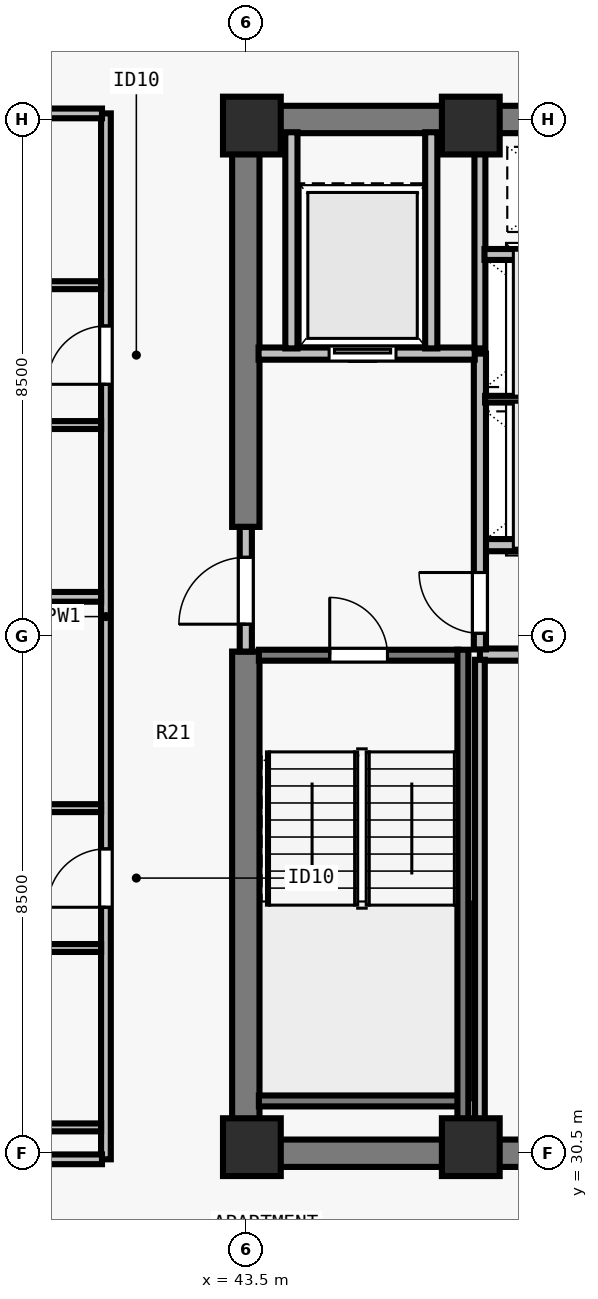
"""IFC4 building model, lengths in metres.
Left out: names, types, materials, properties, quantities, classifications, styles, units other than length and angle.
Written with IfcOpenShell. Run it as: python <this file> out.ifc"""

import sys

from ifc_helpers import new_model, si_unit, direction, frame, frame_2d, origin, origin_2d, place, context, subcontext, project, spatial, rectangle, extrude, element, fill, save


model = new_model("IFC4")
c1 = context("Model", 3, precision=1e-05, world=origin(), true_north=direction((0.0, 1.0)))
c2 = subcontext(c1, "Body", "Model", "MODEL_VIEW")
j1 = project(units=[si_unit("LENGTHUNIT", "METRE"), si_unit("PLANEANGLEUNIT", "RADIAN")], contexts=[c1])
p1 = place(None, origin())
s1 = spatial("IfcSite", under=j1, at=p1, CompositionType="ELEMENT")
p2 = place(p1, origin())
s2 = spatial("IfcBuilding", under=s1, at=p2, CompositionType="ELEMENT")
p3 = place(p2, frame((0.0, 0.0, 241.0)))
s3 = spatial("IfcBuildingStorey", under=s2, at=p3, CompositionType="ELEMENT", Elevation=241.0)
for number, where, z_axis, x_axis in (
    (1, (43.6, 30.6, 0.0), (0.0, 0.0, 1.0), (1.0, 0.0, 0.0)),
    (2, (47.2, 30.6, 0.0), (0.0, 0.0, 1.0), (1.0, 0.0, 0.0)),
    (3, (43.6, 47.4, 0.0), (0.0, 0.0, 1.0), (1.0, 0.0, 0.0)),
    (4, (47.2, 47.4, 0.0), (0.0, 0.0, 1.0), (1.0, 0.0, 0.0)),
):
    element("IfcColumn", number, at=place(p3, frame(where, z_axis=z_axis, x_axis=x_axis)), inside=s3, PredefinedType="COLUMN", context=c2, shape_type="SweptSolid", body=[
        extrude(rectangle(XDim=0.95, YDim=0.95, at=origin_2d()), origin(), (0.0, 0.0, 1.0), 3.5),
    ])
for number, where, z_axis, x_axis in (
    (5, (43.275, 30.5, 0.0), (0.0, 0.0, 1.0), (1.0, 0.0, 0.0)),
    (6, (43.275, 47.5, 0.0), (0.0, 0.0, 1.0), (1.0, 0.0, 0.0)),
):
    element("IfcWall", number, at=place(p3, frame(where, z_axis=z_axis, x_axis=x_axis)), inside=s3, PredefinedType="SHEAR", context=c2, shape_type="SweptSolid", body=[
        extrude(rectangle(XDim=17.45, YDim=0.45, at=frame_2d((8.725, 0.0))), origin(), (0.0, 0.0, 1.0), 3.29),
    ])
p4 = place(p3, frame((43.5, 30.715, 0.0), z_axis=(0.0, 0.0, 1.0), x_axis=(0.0, 1.0, 0.0)))
e7 = element("IfcWall", 7, at=p4, inside=s3, PredefinedType="SHEAR", context=c2, shape_type="SweptSolid", body=[
    extrude(rectangle(XDim=8.035, YDim=0.45, at=frame_2d((4.018, 0.0))), origin(), (0.0, 0.0, 1.0), 3.29),
])
p5 = place(p3, frame((43.5, 40.8, 0.0), z_axis=(0.0, 0.0, 1.0), x_axis=(0.0, 1.0, 0.0)))
e8 = element("IfcWall", 8, at=p5, inside=s3, PredefinedType="SHEAR", context=c2, shape_type="SweptSolid", body=[
    extrude(rectangle(XDim=6.485, YDim=0.45, at=frame_2d((3.242, 0.0))), origin(), (0.0, 0.0, 1.0), 3.29),
])
for number, where, z_axis, x_axis in (
    (9, (47.35, 38.7, 0.0), (0.0, 0.0, 1.0), (1.0, 0.0, 0.0)),
    (10, (47.35, 40.5, 0.0), (0.0, 0.0, 1.0), (1.0, 0.0, 0.0)),
):
    element("IfcWall", number, at=place(p3, frame(where, z_axis=z_axis, x_axis=x_axis)), inside=s3, PredefinedType="SOLIDWALL", context=c2, shape_type="SweptSolid", body=[
        extrude(rectangle(XDim=2.95, YDim=0.2, at=frame_2d((1.475, 0.0))), origin(), (0.0, 0.0, 1.0), 3.29),
    ])
p6 = place(p3, frame((43.5, 38.75, 0.0), z_axis=(0.0, 0.0, 1.0), x_axis=(0.0, 1.0, 0.0)))
e11 = element("IfcWall", 11, at=p6, inside=s3, PredefinedType="SOLIDWALL", context=c2, shape_type="SweptSolid", body=[
    extrude(rectangle(XDim=2.05, YDim=0.2, at=frame_2d((1.025, 0.0))), origin(), (0.0, 0.0, 1.0), 3.29),
])
p7 = place(p6, frame((0.45, 0.0, 0.0)))
e12 = element("IfcOpeningElement", 12, at=p7, cuts=e11, PredefinedType="OPENING", context=c2, shape_type="SweptSolid", body=[
    extrude(rectangle(XDim=1.1, YDim=2.15, at=frame_2d((0.55, 1.075))), frame((0.0, 0.11, 0.0), z_axis=(0.0, -1.0, 0.0), x_axis=(1.0, 0.0, 0.0)), (0.0, 0.0, 1.0), 0.22),
])
p8 = place(p3, frame((47.35, 38.785, 0.0), z_axis=(0.0, 0.0, 1.0), x_axis=(0.0, 1.0, 0.0)))
e13 = element("IfcWall", 13, at=p8, inside=s3, PredefinedType="SOLIDWALL", context=c2, shape_type="SweptSolid", body=[
    extrude(rectangle(XDim=4.865, YDim=0.2, at=frame_2d((2.433, 0.0))), origin(), (0.0, 0.0, 1.0), 3.29),
])
p9 = place(p8, frame((0.265, 0.0, 0.0)))
e14 = element("IfcOpeningElement", 14, at=p9, cuts=e13, PredefinedType="OPENING", context=c2, shape_type="SweptSolid", body=[
    extrude(rectangle(XDim=1.0, YDim=2.15, at=frame_2d((0.5, 1.075))), frame((0.0, 0.11, 0.0), z_axis=(0.0, -1.0, 0.0), x_axis=(1.0, 0.0, 0.0)), (0.0, 0.0, 1.0), 0.22),
])
p10 = place(p3, frame((43.71, 43.65, 0.0), z_axis=(0.0, 0.0, 1.0), x_axis=(1.0, 0.0, 0.0)))
e15 = element("IfcWall", 15, at=p10, inside=s3, PredefinedType="SOLIDWALL", context=c2, shape_type="SweptSolid", body=[
    extrude(rectangle(XDim=3.555, YDim=0.2, at=frame_2d((1.777, 0.0))), origin(), (0.0, 0.0, 1.0), 3.29),
])
p11 = place(p10, frame((1.16, 0.0, 0.0)))
e16 = element("IfcOpeningElement", 16, at=p11, cuts=e15, PredefinedType="OPENING", context=c2, shape_type="SweptSolid", body=[
    extrude(rectangle(XDim=1.1, YDim=2.2, at=frame_2d((0.55, 1.1))), frame((0.0, 0.11, 0.0), z_axis=(0.0, -1.0, 0.0), x_axis=(1.0, 0.0, 0.0)), (0.0, 0.0, 1.0), 0.22),
])
for number, where, z_axis, x_axis in (
    (17, (46.55, 43.735, 0.0), (0.0, 0.0, 1.0), (0.0, 1.0, 0.0)),
    (18, (44.25, 43.735, 0.0), (0.0, 0.0, 1.0), (0.0, 1.0, 0.0)),
):
    element("IfcWall", number, at=place(p3, frame(where, z_axis=z_axis, x_axis=x_axis)), inside=s3, PredefinedType="SOLIDWALL", context=c2, shape_type="SweptSolid", body=[
        extrude(rectangle(XDim=3.555, YDim=0.2, at=frame_2d((1.777, 0.0))), origin(), (0.0, 0.0, 1.0), 3.29),
    ])
p12 = place(p3, frame((47.35, 30.71, 0.0), z_axis=(0.0, 0.0, 1.0), x_axis=(0.0, 1.0, 0.0)))
e19 = element("IfcWall", 19, at=p12, inside=s3, PredefinedType="PARTITIONING", context=c2, shape_type="SweptSolid", body=[
    extrude(rectangle(XDim=7.905, YDim=0.16, at=frame_2d((3.953, 0.0))), origin(), (0.0, 0.0, 1.0), 3.29),
])
p13 = place(p3, frame((47.35, 43.735, 0.0), z_axis=(0.0, 0.0, 1.0), x_axis=(0.0, 1.0, 0.0)))
e20 = element("IfcWall", 20, at=p13, inside=s3, PredefinedType="SOLIDWALL", context=c2, shape_type="SweptSolid", body=[
    extrude(rectangle(XDim=3.555, YDim=0.18, at=frame_2d((1.777, 0.0))), origin(), (0.0, 0.0, 1.0), 3.29),
])
p14 = place(p3, frame((47.435, 42.9, 0.0), z_axis=(0.0, 0.0, 1.0), x_axis=(1.0, 0.0, 0.0)))
e21 = element("IfcWall", 21, at=p14, inside=s3, PredefinedType="PARTITIONING", context=c2, shape_type="SweptSolid", body=[
    extrude(rectangle(XDim=2.78, YDim=0.11, at=frame_2d((1.39, 0.0))), origin(), (0.0, 0.0, 1.0), 3.29),
])
p15 = place(p3, frame((47.425, 45.28, 0.0), z_axis=(0.0, 0.0, 1.0), x_axis=(1.0, 0.0, 0.0)))
e22 = element("IfcWall", 22, at=p15, inside=s3, PredefinedType="SOLIDWALL", context=c2, shape_type="SweptSolid", body=[
    extrude(rectangle(XDim=2.79, YDim=0.18, at=frame_2d((1.395, 0.0))), origin(), (0.0, 0.0, 1.0), 3.29),
])
p16 = place(p3, frame((41.2, 30.4, 0.0), z_axis=(0.0, 0.0, 1.0), x_axis=(0.0, 1.0, 0.0)))
e23 = element("IfcWall", 23, at=p16, inside=s3, PredefinedType="PARTITIONING", context=c2, shape_type="SweptSolid", body=[
    extrude(rectangle(XDim=17.2, YDim=0.16, at=frame_2d((8.6, 0.0))), origin(), (0.0, 0.0, 1.0), 3.29),
])
p17 = place(p16, frame((4.145, 0.0, 0.0)))
e24 = element("IfcOpeningElement", 24, at=p17, cuts=e23, PredefinedType="OPENING", context=c2, shape_type="SweptSolid", body=[
    extrude(rectangle(XDim=0.96, YDim=2.18, at=frame_2d((0.48, 1.09))), frame((0.0, 0.09, 0.0), z_axis=(0.0, -1.0, 0.0), x_axis=(1.0, 0.0, 0.0)), (0.0, 0.0, 1.0), 0.18),
])
p18 = place(p16, frame((12.745, 0.0, 0.0)))
e25 = element("IfcOpeningElement", 25, at=p18, cuts=e23, PredefinedType="OPENING", context=c2, shape_type="SweptSolid", body=[
    extrude(rectangle(XDim=0.96, YDim=2.18, at=frame_2d((0.48, 1.09))), frame((0.0, 0.09, 0.0), z_axis=(0.0, -1.0, 0.0), x_axis=(1.0, 0.0, 0.0)), (0.0, 0.0, 1.0), 0.18),
])
for number, where, z_axis, x_axis in (
    (26, (29.805, 30.4, 0.0), (0.0, 0.0, 1.0), (1.0, 0.0, 0.0)),
    (27, (29.805, 47.6, 0.0), (0.0, 0.0, 1.0), (1.0, 0.0, 0.0)),
):
    element("IfcWall", number, at=place(p3, frame(where, z_axis=z_axis, x_axis=x_axis)), inside=s3, PredefinedType="PARTITIONING", context=c2, shape_type="SweptSolid", body=[
        extrude(rectangle(XDim=11.33, YDim=0.16, at=frame_2d((5.665, 0.0))), origin(), (0.0, 0.0, 1.0), 3.29),
    ])
p19 = place(p3, frame((29.77, 39.65, 0.0), z_axis=(0.0, 0.0, 1.0), x_axis=(1.0, 0.0, 0.0)))
e28 = element("IfcWall", 28, at=p19, inside=s3, PredefinedType="PARTITIONING", context=c2, shape_type="SweptSolid", body=[
    extrude(rectangle(XDim=11.35, YDim=0.16, at=frame_2d((5.675, 0.0))), origin(), (0.0, 0.0, 1.0), 2.958),
])
p20 = place(p3, frame((38.37, 30.925, 0.0), z_axis=(0.0, 0.0, 1.0), x_axis=(1.0, 0.0, 0.0)))
e29 = element("IfcWall", 29, at=p20, inside=s3, PredefinedType="PLUMBINGWALL", context=c2, shape_type="SweptSolid", body=[
    extrude(rectangle(XDim=2.75, YDim=0.13, at=frame_2d((1.375, 0.0))), origin(), (0.0, 0.0, 1.0), 3.29),
])
p21 = place(p3, frame((38.37, 33.875, 0.0), z_axis=(0.0, 0.0, 1.0), x_axis=(1.0, 0.0, 0.0)))
e30 = element("IfcWall", 30, at=p21, inside=s3, PredefinedType="PLUMBINGWALL", context=c2, shape_type="SweptSolid", body=[
    extrude(rectangle(XDim=2.75, YDim=0.13, at=frame_2d((1.375, 0.0))), origin(), (0.0, 0.0, 1.0), 3.29),
])
p22 = place(p21, frame((0.55, 0.0, 0.0)))
e31 = element("IfcOpeningElement", 31, at=p22, cuts=e30, PredefinedType="OPENING", context=c2, shape_type="SweptSolid", body=[
    extrude(rectangle(XDim=0.85, YDim=2.08, at=frame_2d((0.425, 1.04))), frame((0.0, 0.075, 0.0), z_axis=(0.0, -1.0, 0.0), x_axis=(1.0, 0.0, 0.0)), (0.0, 0.0, 1.0), 0.15),
])
p23 = place(p3, frame((38.37, 36.175, 0.0), z_axis=(0.0, 0.0, 1.0), x_axis=(1.0, 0.0, 0.0)))
e32 = element("IfcWall", 32, at=p23, inside=s3, PredefinedType="PLUMBINGWALL", context=c2, shape_type="SweptSolid", body=[
    extrude(rectangle(XDim=2.75, YDim=0.13, at=frame_2d((1.375, 0.0))), origin(), (0.0, 0.0, 1.0), 3.29),
])
p24 = place(p23, frame((0.55, 0.0, 0.0)))
e33 = element("IfcOpeningElement", 33, at=p24, cuts=e32, PredefinedType="OPENING", context=c2, shape_type="SweptSolid", body=[
    extrude(rectangle(XDim=0.88, YDim=2.1, at=frame_2d((0.44, 1.05))), frame((0.0, 0.075, 0.0), z_axis=(0.0, -1.0, 0.0), x_axis=(1.0, 0.0, 0.0)), (0.0, 0.0, 1.0), 0.15),
])
p25 = place(p3, frame((38.37, 42.475, 0.0), z_axis=(0.0, 0.0, 1.0), x_axis=(1.0, 0.0, 0.0)))
e34 = element("IfcWall", 34, at=p25, inside=s3, PredefinedType="PLUMBINGWALL", context=c2, shape_type="SweptSolid", body=[
    extrude(rectangle(XDim=2.75, YDim=0.13, at=frame_2d((1.375, 0.0))), origin(), (0.0, 0.0, 1.0), 2.958),
])
p26 = place(p25, frame((0.55, 0.0, 0.0)))
e35 = element("IfcOpeningElement", 35, at=p26, cuts=e34, PredefinedType="OPENING", context=c2, shape_type="SweptSolid", body=[
    extrude(rectangle(XDim=0.85, YDim=2.08, at=frame_2d((0.425, 1.04))), frame((0.0, 0.075, 0.0), z_axis=(0.0, -1.0, 0.0), x_axis=(1.0, 0.0, 0.0)), (0.0, 0.0, 1.0), 0.15),
])
p27 = place(p3, frame((38.37, 44.775, 0.0), z_axis=(0.0, 0.0, 1.0), x_axis=(1.0, 0.0, 0.0)))
e36 = element("IfcWall", 36, at=p27, inside=s3, PredefinedType="PLUMBINGWALL", context=c2, shape_type="SweptSolid", body=[
    extrude(rectangle(XDim=2.75, YDim=0.13, at=frame_2d((1.375, 0.0))), origin(), (0.0, 0.0, 1.0), 2.958),
])
p28 = place(p27, frame((0.55, 0.0, 0.0)))
e37 = element("IfcOpeningElement", 37, at=p28, cuts=e36, PredefinedType="OPENING", context=c2, shape_type="SweptSolid", body=[
    extrude(rectangle(XDim=0.88, YDim=2.1, at=frame_2d((0.44, 1.05))), frame((0.0, 0.075, 0.0), z_axis=(0.0, -1.0, 0.0), x_axis=(1.0, 0.0, 0.0)), (0.0, 0.0, 1.0), 0.15),
])
p29 = place(p3, frame((43.715, 38.69, 0.0), z_axis=(0.0, 0.0, 1.0), x_axis=(1.0, 0.0, 0.0)))
e38 = element("IfcWall", 38, at=p29, inside=s3, PredefinedType="SOLIDWALL", context=c2, shape_type="SweptSolid", body=[
    extrude(rectangle(XDim=3.28, YDim=0.18, at=frame_2d((1.64, 0.0))), origin(), (0.0, 0.0, 1.0), 3.29),
])
p30 = place(p29, frame((1.165, 0.0, 0.0)))
e39 = element("IfcOpeningElement", 39, at=p30, cuts=e38, PredefinedType="OPENING", context=c2, shape_type="SweptSolid", body=[
    extrude(rectangle(XDim=0.95, YDim=2.15, at=frame_2d((0.475, 1.075))), frame((0.0, 0.1, 0.0), z_axis=(0.0, -1.0, 0.0), x_axis=(1.0, 0.0, 0.0)), (0.0, 0.0, 1.0), 0.2),
])
p31 = place(p3, frame((43.715, 31.36, 0.0), z_axis=(0.0, 0.0, 1.0), x_axis=(1.0, 0.0, 0.0)))
e40 = element("IfcWall", 40, at=p31, inside=s3, PredefinedType="SOLIDWALL", context=c2, shape_type="SweptSolid", body=[
    extrude(rectangle(XDim=3.28, YDim=0.18, at=frame_2d((1.64, 0.0))), origin(), (0.0, 0.0, 1.0), 3.29),
])
p32 = place(p3, frame((47.07, 38.78, 0.0), z_axis=(0.0, 0.0, 1.0), x_axis=(0.0, -1.0, 0.0)))
e41 = element("IfcWall", 41, at=p32, inside=s3, PredefinedType="SOLIDWALL", context=c2, shape_type="SweptSolid", body=[
    extrude(rectangle(XDim=8.067, YDim=0.18, at=frame_2d((4.034, 0.0))), origin(), (0.0, 0.0, 1.0), 3.29),
])
p33 = place(p7, origin())
e42 = element("IfcDoor", 42, at=p33, inside=s3, OperationType="SINGLE_SWING_LEFT", PredefinedType="DOOR", context=c2, shape_type="SweptSolid", body=[
    extrude(rectangle(XDim=1.1, YDim=2.15, at=frame_2d((0.55, 1.075))), frame((0.0, 0.025, 0.0), z_axis=(0.0, -1.0, 0.0), x_axis=(1.0, 0.0, 0.0)), (0.0, 0.0, 1.0), 0.05),
])
fill(e12, e42)
p34 = place(p9, origin())
e43 = element("IfcDoor", 43, at=p34, inside=s3, OperationType="SINGLE_SWING_RIGHT", PredefinedType="DOOR", context=c2, shape_type="SweptSolid", body=[
    extrude(rectangle(XDim=1.0, YDim=2.15, at=frame_2d((0.5, 1.075))), frame((0.0, 0.025, 0.0), z_axis=(0.0, -1.0, 0.0), x_axis=(1.0, 0.0, 0.0)), (0.0, 0.0, 1.0), 0.05),
])
fill(e14, e43)
p35 = place(p11, origin())
e44 = element("IfcDoor", 44, at=p35, inside=s3, OperationType="SLIDING_TO_LEFT", PredefinedType="DOOR", context=c2, shape_type="SweptSolid", body=[
    extrude(rectangle(XDim=1.1, YDim=2.2, at=frame_2d((0.55, 1.1))), frame((0.0, 0.025, 0.0), z_axis=(0.0, -1.0, 0.0), x_axis=(1.0, 0.0, 0.0)), (0.0, 0.0, 1.0), 0.05),
])
fill(e16, e44)
p36 = place(p17, origin())
e45 = element("IfcDoor", 45, at=p36, inside=s3, OperationType="SINGLE_SWING_LEFT", PredefinedType="DOOR", context=c2, shape_type="SweptSolid", body=[
    extrude(rectangle(XDim=0.96, YDim=2.18, at=frame_2d((0.48, 1.09))), frame((0.0, 0.025, 0.0), z_axis=(0.0, -1.0, 0.0), x_axis=(1.0, 0.0, 0.0)), (0.0, 0.0, 1.0), 0.05),
])
fill(e24, e45)
p37 = place(p18, origin())
e46 = element("IfcDoor", 46, at=p37, inside=s3, OperationType="SINGLE_SWING_LEFT", PredefinedType="DOOR", context=c2, shape_type="SweptSolid", body=[
    extrude(rectangle(XDim=0.96, YDim=2.18, at=frame_2d((0.48, 1.09))), frame((0.0, 0.025, 0.0), z_axis=(0.0, -1.0, 0.0), x_axis=(1.0, 0.0, 0.0)), (0.0, 0.0, 1.0), 0.05),
])
fill(e25, e46)
p38 = place(p30, origin())
e47 = element("IfcDoor", 47, at=p38, inside=s3, OperationType="SINGLE_SWING_LEFT", PredefinedType="DOOR", context=c2, shape_type="SweptSolid", body=[
    extrude(rectangle(XDim=0.95, YDim=2.15, at=frame_2d((0.475, 1.075))), frame((0.0, 0.025, 0.0), z_axis=(0.0, -1.0, 0.0), x_axis=(1.0, 0.0, 0.0)), (0.0, 0.0, 1.0), 0.05),
])
fill(e39, e47)
save(model, sys.argv[1])
